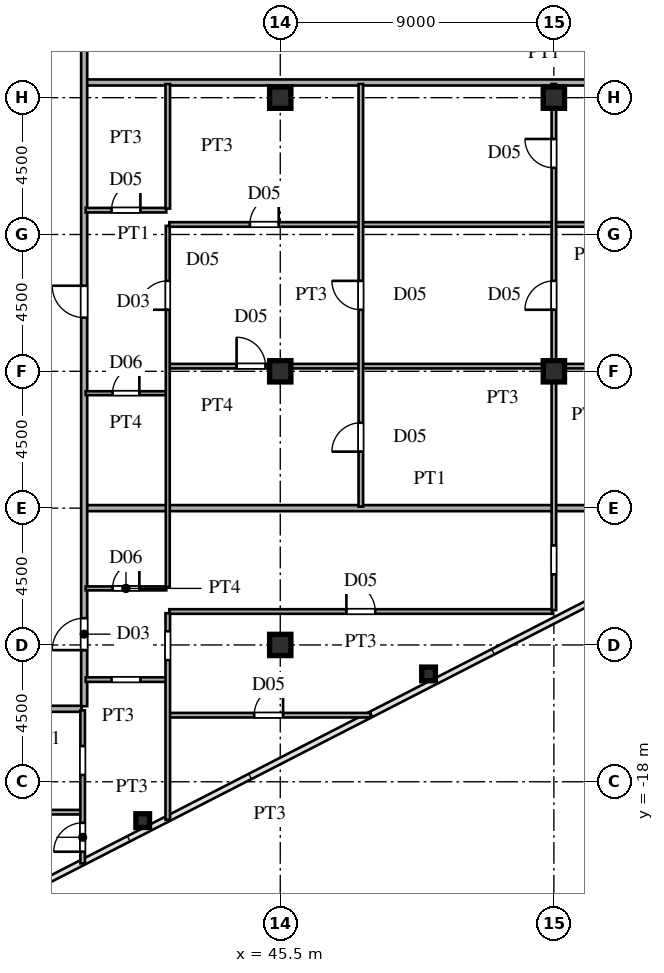
"""IFC4 building model, lengths in metres.
Left out: names, types, materials, properties, quantities, classifications, styles, units other than length and angle.
Written with IfcOpenShell. Run it as: python <this file> out.ifc"""

import sys

from ifc_helpers import new_model, si_unit, direction, frame, frame_2d, origin, origin_2d, place, context, subcontext, project, spatial, rectangle, hollow_rectangle, i_section, extrude, source, transform, mapped, element, fill, save


model = new_model("IFC4")
c1 = context("Model", 3, precision=1e-05, world=origin(), true_north=direction((0.0, 1.0)))
c2 = subcontext(c1, "Body", "Model", "MODEL_VIEW")
j1 = project(units=[si_unit("LENGTHUNIT", "METRE"), si_unit("PLANEANGLEUNIT", "RADIAN")], contexts=[c1])
p1 = place(None, origin())
s1 = spatial("IfcSite", under=j1, at=p1, CompositionType="ELEMENT")
p2 = place(p1, origin())
s2 = spatial("IfcBuilding", under=s1, at=p2, CompositionType="ELEMENT")
p3 = place(p2, frame((0.0, 0.0, 132.0)))
s3 = spatial("IfcBuildingStorey", under=s2, at=p3, CompositionType="ELEMENT", Elevation=132.0)
m1 = source(origin(), c2, "Body", "SweptSolid", [
    extrude(i_section(OverallWidth=0.7, OverallDepth=0.7, WebThickness=0.028, FlangeThickness=0.045, at=origin_2d()), origin(), (0.0, 0.0, 1.0), 3.6),
])
for number, where, z_axis, x_axis in (
    (1, (45.5, -13.5, 0.0), (0.0, 0.0, 1.0), (1.0, 0.0, 0.0)),
    (2, (45.5, -4.5, 0.0), (0.0, 0.0, 1.0), (1.0, 0.0, 0.0)),
    (3, (45.5, 4.5, 0.0), (0.0, 0.0, 1.0), (1.0, 0.0, 0.0)),
    (4, (54.5, -4.5, 0.0), (0.0, 0.0, 1.0), (1.0, 0.0, 0.0)),
    (5, (54.5, 4.5, 0.0), (0.0, 0.0, 1.0), (1.0, 0.0, 0.0)),
):
    element("IfcColumn", number, at=place(p3, frame(where, z_axis=z_axis, x_axis=x_axis)), inside=s3, PredefinedType="COLUMN", context=c2, shape_type="MappedRepresentation", body=[
        mapped(m1, transform((0.0, 0.0, 0.0), scale=1.0)),
    ])
m2 = source(origin(), c2, "Body", "SweptSolid", [
    extrude(hollow_rectangle(XDim=0.45, YDim=0.45, WallThickness=0.018, at=origin_2d()), origin(), (0.0, 0.0, 1.0), 3.6),
])
for number, where, z_axis, x_axis in (
    (6, (40.976, -19.278, 0.0), (0.0, 0.0, 1.0), (1.0, 0.0, 0.0)),
    (7, (50.377, -14.453, 0.0), (0.0, 0.0, 1.0), (1.0, 0.0, 0.0)),
):
    element("IfcColumn", number, at=place(p3, frame(where, z_axis=z_axis, x_axis=x_axis)), inside=s3, PredefinedType="COLUMN", context=c2, shape_type="MappedRepresentation", body=[
        mapped(m2, transform((0.0, 0.0, 0.0), scale=1.0)),
    ])
p4 = place(p3, frame((27.465, -19.0, 0.0), z_axis=(0.0, 0.0, 1.0), x_axis=(1.0, 0.0, 0.0)))
e8 = element("IfcWall", 8, at=p4, inside=s3, PredefinedType="PARTITIONING", context=c2, shape_type="SweptSolid", body=[
    extrude(rectangle(XDim=11.485, YDim=0.15, at=frame_2d((5.742, 0.0))), origin(), (0.0, 0.0, 1.0), 3.34),
])
p5 = place(p3, frame((41.85, -15.81, 0.0), z_axis=(0.0, 0.0, 1.0), x_axis=(1.0, 0.0, 0.0)))
e9 = element("IfcWall", 9, at=p5, inside=s3, PredefinedType="PARTITIONING", context=c2, shape_type="SweptSolid", body=[
    extrude(rectangle(XDim=6.62, YDim=0.15, at=frame_2d((3.31, 0.0))), origin(), (0.0, 0.0, 1.0), 3.34),
])
p6 = place(p5, frame((2.792, 0.0, 0.0)))
e10 = element("IfcOpeningElement", 10, at=p6, cuts=e9, PredefinedType="OPENING", context=c2, shape_type="SweptSolid", body=[
    extrude(rectangle(XDim=0.95, YDim=2.15, at=frame_2d((0.475, 1.075))), frame((0.0, 0.085, 0.0), z_axis=(0.0, -1.0, 0.0), x_axis=(1.0, 0.0, 0.0)), (0.0, 0.0, 1.0), 0.17),
])
p7 = place(p3, frame((36.585, -15.6, 0.0), z_axis=(0.0, 0.0, 1.0), x_axis=(1.0, 0.0, 0.0)))
e11 = element("IfcWall", 11, at=p7, inside=s3, PredefinedType="PARTITIONING", context=c2, shape_type="SweptSolid", body=[
    extrude(rectangle(XDim=2.38, YDim=0.2, at=frame_2d((1.19, 0.0))), origin(), (0.0, 0.0, 1.0), 3.34),
])
p8 = place(p3, frame((39.1, -14.64, 0.0), z_axis=(0.0, 0.0, 1.0), x_axis=(1.0, 0.0, 0.0)))
e12 = element("IfcWall", 12, at=p8, inside=s3, PredefinedType="PARTITIONING", context=c2, shape_type="SweptSolid", body=[
    extrude(rectangle(XDim=2.65, YDim=0.15, at=frame_2d((1.325, 0.0))), origin(), (0.0, 0.0, 1.0), 3.34),
])
p9 = place(p8, frame((0.85, 0.0, 0.0)))
e13 = element("IfcOpeningElement", 13, at=p9, cuts=e12, PredefinedType="OPENING", context=c2, shape_type="SweptSolid", body=[
    extrude(rectangle(XDim=0.95, YDim=2.15, at=frame_2d((0.475, 1.075))), frame((0.0, 0.085, 0.0), z_axis=(0.0, -1.0, 0.0), x_axis=(1.0, 0.0, 0.0)), (0.0, 0.0, 1.0), 0.17),
])
p10 = place(p3, frame((41.85, -12.4, 0.0), z_axis=(0.0, 0.0, 1.0), x_axis=(1.0, 0.0, 0.0)))
e14 = element("IfcWall", 14, at=p10, inside=s3, PredefinedType="PARTITIONING", context=c2, shape_type="SweptSolid", body=[
    extrude(rectangle(XDim=12.6, YDim=0.15, at=frame_2d((6.3, 0.0))), origin(), (0.0, 0.0, 1.0), 3.34),
])
p11 = place(p10, frame((5.825, 0.0, 0.0)))
e15 = element("IfcOpeningElement", 15, at=p11, cuts=e14, PredefinedType="OPENING", context=c2, shape_type="SweptSolid", body=[
    extrude(rectangle(XDim=0.95, YDim=2.15, at=frame_2d((0.475, 1.075))), frame((0.0, 0.085, 0.0), z_axis=(0.0, -1.0, 0.0), x_axis=(1.0, 0.0, 0.0)), (0.0, 0.0, 1.0), 0.17),
])
p12 = place(p3, frame((39.1, -11.64, 0.0), z_axis=(0.0, 0.0, 1.0), x_axis=(1.0, 0.0, 0.0)))
e16 = element("IfcWall", 16, at=p12, inside=s3, PredefinedType="PARTITIONING", context=c2, shape_type="SweptSolid", body=[
    extrude(rectangle(XDim=2.65, YDim=0.13, at=frame_2d((1.325, 0.0))), origin(), (0.0, 0.0, 1.0), 3.34),
])
p13 = place(p12, frame((0.885, 0.0, 0.0)))
e17 = element("IfcOpeningElement", 17, at=p13, cuts=e16, PredefinedType="OPENING", context=c2, shape_type="SweptSolid", body=[
    extrude(rectangle(XDim=0.88, YDim=2.1, at=frame_2d((0.44, 1.05))), frame((0.0, 0.075, 0.0), z_axis=(0.0, -1.0, 0.0), x_axis=(1.0, 0.0, 0.0)), (0.0, 0.0, 1.0), 0.15),
])
p14 = place(p3, frame((39.13, -9.0, 0.0), z_axis=(0.0, 0.0, 1.0), x_axis=(1.0, 0.0, 0.0)))
e18 = element("IfcWall", 18, at=p14, inside=s3, PredefinedType="PARTITIONING", context=c2, shape_type="SweptSolid", body=[
    extrude(rectangle(XDim=22.586, YDim=0.2, at=frame_2d((11.293, 0.0))), origin(), (0.0, 0.0, 1.0), 3.34),
])
p15 = place(p3, frame((39.1, -5.22, 0.0), z_axis=(0.0, 0.0, 1.0), x_axis=(1.0, 0.0, 0.0)))
e19 = element("IfcWall", 19, at=p15, inside=s3, PredefinedType="PARTITIONING", context=c2, shape_type="SweptSolid", body=[
    extrude(rectangle(XDim=2.65, YDim=0.13, at=frame_2d((1.325, 0.0))), origin(), (0.0, 0.0, 1.0), 3.34),
])
p16 = place(p15, frame((0.885, 0.0, 0.0)))
e20 = element("IfcOpeningElement", 20, at=p16, cuts=e19, PredefinedType="OPENING", context=c2, shape_type="SweptSolid", body=[
    extrude(rectangle(XDim=0.88, YDim=2.1, at=frame_2d((0.44, 1.05))), frame((0.0, 0.075, 0.0), z_axis=(0.0, -1.0, 0.0), x_axis=(1.0, 0.0, 0.0)), (0.0, 0.0, 1.0), 0.15),
])
p17 = place(p3, frame((41.85, -4.33, 0.0), z_axis=(0.0, 0.0, 1.0), x_axis=(1.0, 0.0, 0.0)))
e21 = element("IfcWall", 21, at=p17, inside=s3, PredefinedType="PARTITIONING", context=c2, shape_type="SweptSolid", body=[
    extrude(rectangle(XDim=27.525, YDim=0.15, at=frame_2d((13.762, 0.0))), origin(), (0.0, 0.0, 1.0), 3.34),
])
p18 = place(p17, frame((2.214, 0.0, 0.0)))
e22 = element("IfcOpeningElement", 22, at=p18, cuts=e21, PredefinedType="OPENING", context=c2, shape_type="SweptSolid", body=[
    extrude(rectangle(XDim=0.95, YDim=2.15, at=frame_2d((0.475, 1.075))), frame((0.0, 0.085, 0.0), z_axis=(0.0, -1.0, 0.0), x_axis=(1.0, 0.0, 0.0)), (0.0, 0.0, 1.0), 0.17),
])
p19 = place(p17, frame((15.025, 0.0, 0.0)))
e23 = element("IfcOpeningElement", 23, at=p19, cuts=e21, PredefinedType="OPENING", context=c2, shape_type="SweptSolid", body=[
    extrude(rectangle(XDim=0.95, YDim=2.15, at=frame_2d((0.475, 1.075))), frame((0.0, 0.085, 0.0), z_axis=(0.0, -1.0, 0.0), x_axis=(1.0, 0.0, 0.0)), (0.0, 0.0, 1.0), 0.17),
])
p20 = place(p3, frame((41.85, 0.33, 0.0), z_axis=(0.0, 0.0, 1.0), x_axis=(1.0, 0.0, 0.0)))
e24 = element("IfcWall", 24, at=p20, inside=s3, PredefinedType="PARTITIONING", context=c2, shape_type="SweptSolid", body=[
    extrude(rectangle(XDim=27.685, YDim=0.15, at=frame_2d((13.842, 0.0))), origin(), (0.0, 0.0, 1.0), 3.34),
])
p21 = place(p20, frame((2.65, 0.0, 0.0)))
e25 = element("IfcOpeningElement", 25, at=p21, cuts=e24, PredefinedType="OPENING", context=c2, shape_type="SweptSolid", body=[
    extrude(rectangle(XDim=0.95, YDim=2.15, at=frame_2d((0.475, 1.075))), frame((0.0, 0.085, 0.0), z_axis=(0.0, -1.0, 0.0), x_axis=(1.0, 0.0, 0.0)), (0.0, 0.0, 1.0), 0.17),
])
p22 = place(p20, frame((15.025, 0.0, 0.0)))
e26 = element("IfcOpeningElement", 26, at=p22, cuts=e24, PredefinedType="OPENING", context=c2, shape_type="SweptSolid", body=[
    extrude(rectangle(XDim=0.95, YDim=2.15, at=frame_2d((0.475, 1.075))), frame((0.0, 0.085, 0.0), z_axis=(0.0, -1.0, 0.0), x_axis=(1.0, 0.0, 0.0)), (0.0, 0.0, 1.0), 0.17),
])
p23 = place(p3, frame((39.1, 0.8, 0.0), z_axis=(0.0, 0.0, 1.0), x_axis=(1.0, 0.0, 0.0)))
e27 = element("IfcWall", 27, at=p23, inside=s3, PredefinedType="PARTITIONING", context=c2, shape_type="SweptSolid", body=[
    extrude(rectangle(XDim=2.65, YDim=0.15, at=frame_2d((1.325, 0.0))), origin(), (0.0, 0.0, 1.0), 3.34),
])
p24 = place(p23, frame((0.85, 0.0, 0.0)))
e28 = element("IfcOpeningElement", 28, at=p24, cuts=e27, PredefinedType="OPENING", context=c2, shape_type="SweptSolid", body=[
    extrude(rectangle(XDim=0.95, YDim=2.15, at=frame_2d((0.475, 1.075))), frame((0.0, 0.085, 0.0), z_axis=(0.0, -1.0, 0.0), x_axis=(1.0, 0.0, 0.0)), (0.0, 0.0, 1.0), 0.17),
])
p25 = place(p3, frame((39.13, 5.0, 0.0), z_axis=(0.0, 0.0, 1.0), x_axis=(1.0, 0.0, 0.0)))
e29 = element("IfcWall", 29, at=p25, inside=s3, PredefinedType="PARTITIONING", context=c2, shape_type="SweptSolid", body=[
    extrude(rectangle(XDim=30.096, YDim=0.2, at=frame_2d((15.048, 0.0))), origin(), (0.0, 0.0, 1.0), 3.34),
])
p26 = place(p3, frame((39.0, -20.686, 0.0), z_axis=(0.0, 0.0, 1.0), x_axis=(0.0, 1.0, 0.0)))
e30 = element("IfcWall", 30, at=p26, inside=s3, PredefinedType="PARTITIONING", context=c2, shape_type="SweptSolid", body=[
    extrude(rectangle(XDim=5.036, YDim=0.15, at=frame_2d((2.518, 0.0))), origin(), (0.0, 0.0, 1.0), 3.34),
])
p27 = place(p26, frame((0.385, 0.0, 0.0)))
e31 = element("IfcOpeningElement", 31, at=p27, cuts=e30, PredefinedType="OPENING", context=c2, shape_type="SweptSolid", body=[
    extrude(rectangle(XDim=0.95, YDim=2.15, at=frame_2d((0.475, 1.075))), frame((0.0, 0.085, 0.0), z_axis=(0.0, -1.0, 0.0), x_axis=(1.0, 0.0, 0.0)), (0.0, 0.0, 1.0), 0.17),
])
p28 = place(p26, frame((2.911, 0.0, 0.0)))
e32 = element("IfcOpeningElement", 32, at=p28, cuts=e30, PredefinedType="OPENING", context=c2, shape_type="SweptSolid", body=[
    extrude(rectangle(XDim=0.95, YDim=2.15, at=frame_2d((0.475, 1.075))), frame((0.0, 0.085, 0.0), z_axis=(0.0, -1.0, 0.0), x_axis=(1.0, 0.0, 0.0)), (0.0, 0.0, 1.0), 0.17),
])
p29 = place(p3, frame((39.05, -15.515, 0.0), z_axis=(0.0, 0.0, 1.0), x_axis=(0.0, 1.0, 0.0)))
e33 = element("IfcWall", 33, at=p29, inside=s3, PredefinedType="PARTITIONING", context=c2, shape_type="SweptSolid", body=[
    extrude(rectangle(XDim=31.03, YDim=0.2, at=frame_2d((15.515, 0.0))), origin(), (0.0, 0.0, 1.0), 3.34),
])
p30 = place(p29, frame((1.845, 0.0, 0.0)))
e34 = element("IfcOpeningElement", 34, at=p30, cuts=e33, PredefinedType="OPENING", context=c2, shape_type="SweptSolid", body=[
    extrude(rectangle(XDim=1.05, YDim=2.25, at=frame_2d((0.525, 1.125))), frame((0.0, 0.11, 0.0), z_axis=(0.0, -1.0, 0.0), x_axis=(1.0, 0.0, 0.0)), (0.0, 0.0, 1.0), 0.22),
])
p31 = place(p29, frame((12.78, 0.0, 0.0)))
e35 = element("IfcOpeningElement", 35, at=p31, cuts=e33, PredefinedType="OPENING", context=c2, shape_type="SweptSolid", body=[
    extrude(rectangle(XDim=1.05, YDim=2.25, at=frame_2d((0.525, 1.125))), frame((0.0, 0.11, 0.0), z_axis=(0.0, -1.0, 0.0), x_axis=(1.0, 0.0, 0.0)), (0.0, 0.0, 1.0), 0.22),
])
p32 = place(p29, frame((25.29, 0.0, 0.0)))
e36 = element("IfcOpeningElement", 36, at=p32, cuts=e33, PredefinedType="OPENING", context=c2, shape_type="SweptSolid", body=[
    extrude(rectangle(XDim=1.05, YDim=2.25, at=frame_2d((0.525, 1.125))), frame((0.0, 0.11, 0.0), z_axis=(0.0, -1.0, 0.0), x_axis=(1.0, 0.0, 0.0)), (0.0, 0.0, 1.0), 0.22),
])
p33 = place(p3, frame((41.8, -19.25, 0.0), z_axis=(0.0, 0.0, 1.0), x_axis=(0.0, 1.0, 0.0)))
e37 = element("IfcWall", 37, at=p33, inside=s3, PredefinedType="PARTITIONING", context=c2, shape_type="SweptSolid", body=[
    extrude(rectangle(XDim=6.795, YDim=0.15, at=frame_2d((3.397, 0.0))), origin(), (0.0, 0.0, 1.0), 3.34),
])
p34 = place(p33, frame((5.25, 0.0, 0.0)))
e38 = element("IfcOpeningElement", 38, at=p34, cuts=e37, PredefinedType="OPENING", context=c2, shape_type="SweptSolid", body=[
    extrude(rectangle(XDim=0.95, YDim=2.15, at=frame_2d((0.475, 1.075))), frame((0.0, 0.085, 0.0), z_axis=(0.0, -1.0, 0.0), x_axis=(1.0, 0.0, 0.0)), (0.0, 0.0, 1.0), 0.17),
])
p35 = place(p3, frame((41.8, -11.595, 0.0), z_axis=(0.0, 0.0, 1.0), x_axis=(0.0, 1.0, 0.0)))
e39 = element("IfcWall", 39, at=p35, inside=s3, PredefinedType="PARTITIONING", context=c2, shape_type="SweptSolid", body=[
    extrude(rectangle(XDim=11.878, YDim=0.13, at=frame_2d((5.939, 0.0))), origin(), (0.0, 0.0, 1.0), 3.34),
])
p36 = place(p35, frame((9.12, 0.0, 0.0)))
e40 = element("IfcOpeningElement", 40, at=p36, cuts=e39, PredefinedType="OPENING", context=c2, shape_type="SweptSolid", body=[
    extrude(rectangle(XDim=0.95, YDim=2.15, at=frame_2d((0.475, 1.075))), frame((0.0, 0.075, 0.0), z_axis=(0.0, -1.0, 0.0), x_axis=(1.0, 0.0, 0.0)), (0.0, 0.0, 1.0), 0.15),
])
p37 = place(p3, frame((41.8, 0.852, 0.0), z_axis=(0.0, 0.0, 1.0), x_axis=(0.0, 1.0, 0.0)))
e41 = element("IfcWall", 41, at=p37, inside=s3, PredefinedType="PARTITIONING", context=c2, shape_type="SweptSolid", body=[
    extrude(rectangle(XDim=4.098, YDim=0.15, at=frame_2d((2.049, 0.0))), origin(), (0.0, 0.0, 1.0), 3.34),
])
p38 = place(p3, frame((48.15, -8.95, 0.0), z_axis=(0.0, 0.0, 1.0), x_axis=(0.0, 1.0, 0.0)))
e42 = element("IfcWall", 42, at=p38, inside=s3, PredefinedType="PARTITIONING", context=c2, shape_type="SweptSolid", body=[
    extrude(rectangle(XDim=13.9, YDim=0.15, at=frame_2d((6.95, 0.0))), origin(), (0.0, 0.0, 1.0), 3.34),
])
p39 = place(p38, frame((6.475, 0.0, 0.0)))
e43 = element("IfcOpeningElement", 43, at=p39, cuts=e42, PredefinedType="OPENING", context=c2, shape_type="SweptSolid", body=[
    extrude(rectangle(XDim=0.95, YDim=2.15, at=frame_2d((0.475, 1.075))), frame((0.0, 0.085, 0.0), z_axis=(0.0, -1.0, 0.0), x_axis=(1.0, 0.0, 0.0)), (0.0, 0.0, 1.0), 0.17),
])
p40 = place(p38, frame((1.808, 0.0, 0.0)))
e44 = element("IfcOpeningElement", 44, at=p40, cuts=e42, PredefinedType="OPENING", context=c2, shape_type="SweptSolid", body=[
    extrude(rectangle(XDim=0.95, YDim=2.15, at=frame_2d((0.475, 1.075))), frame((0.0, 0.085, 0.0), z_axis=(0.0, -1.0, 0.0), x_axis=(1.0, 0.0, 0.0)), (0.0, 0.0, 1.0), 0.17),
])
p41 = place(p3, frame((54.5, -12.355, 0.0), z_axis=(0.0, 0.0, 1.0), x_axis=(0.0, 1.0, 0.0)))
e45 = element("IfcWall", 45, at=p41, inside=s3, PredefinedType="PARTITIONING", context=c2, shape_type="SweptSolid", body=[
    extrude(rectangle(XDim=7.835, YDim=0.15, at=frame_2d((3.917, 0.0))), origin(), (0.0, 0.0, 1.0), 3.34),
])
p42 = place(p41, frame((1.177, 0.0, 0.0)))
e46 = element("IfcOpeningElement", 46, at=p42, cuts=e45, PredefinedType="OPENING", context=c2, shape_type="SweptSolid", body=[
    extrude(rectangle(XDim=0.95, YDim=2.15, at=frame_2d((0.475, 1.075))), frame((0.0, 0.085, 0.0), z_axis=(0.0, -1.0, 0.0), x_axis=(1.0, 0.0, 0.0)), (0.0, 0.0, 1.0), 0.17),
])
p43 = place(p3, frame((54.5, -4.52, 0.0), z_axis=(0.0, 0.0, 1.0), x_axis=(0.0, 1.0, 0.0)))
e47 = element("IfcWall", 47, at=p43, inside=s3, PredefinedType="PARTITIONING", context=c2, shape_type="SweptSolid", body=[
    extrude(rectangle(XDim=9.47, YDim=0.15, at=frame_2d((4.735, 0.0))), origin(), (0.0, 0.0, 1.0), 2.44),
])
p44 = place(p43, frame((2.045, 0.0, 0.0)))
e48 = element("IfcOpeningElement", 48, at=p44, cuts=e47, PredefinedType="OPENING", context=c2, shape_type="SweptSolid", body=[
    extrude(rectangle(XDim=0.95, YDim=2.15, at=frame_2d((0.475, 1.075))), frame((0.0, 0.085, 0.0), z_axis=(0.0, -1.0, 0.0), x_axis=(1.0, 0.0, 0.0)), (0.0, 0.0, 1.0), 0.17),
])
p45 = place(p43, frame((6.712, 0.0, 0.0)))
e49 = element("IfcOpeningElement", 49, at=p45, cuts=e47, PredefinedType="OPENING", context=c2, shape_type="SweptSolid", body=[
    extrude(rectangle(XDim=0.95, YDim=2.15, at=frame_2d((0.475, 1.075))), frame((0.0, 0.085, 0.0), z_axis=(0.0, -1.0, 0.0), x_axis=(1.0, 0.0, 0.0)), (0.0, 0.0, 1.0), 0.17),
])
m3 = source(origin(), c2, "Body", "SweptSolid", [
    extrude(rectangle(XDim=0.95, YDim=2.15, at=frame_2d((0.475, 1.075))), frame((0.0, 0.025, 0.0), z_axis=(0.0, -1.0, 0.0), x_axis=(1.0, 0.0, 0.0)), (0.0, 0.0, 1.0), 0.05),
])
p46 = place(p6, origin())
e50 = element("IfcDoor", 50, at=p46, inside=s3, OperationType="SINGLE_SWING_RIGHT", PredefinedType="DOOR", context=c2, shape_type="MappedRepresentation", body=[
    mapped(m3, transform((0.0, 0.0, 0.0), scale=1.0)),
])
fill(e10, e50)
p47 = place(p11, origin())
e51 = element("IfcDoor", 51, at=p47, inside=s3, OperationType="SINGLE_SWING_LEFT", PredefinedType="DOOR", context=c2, shape_type="MappedRepresentation", body=[
    mapped(m3, transform((0.0, 0.0, 0.0), scale=1.0)),
])
fill(e15, e51)
m4 = source(origin(), c2, "Body", "SweptSolid", [
    extrude(rectangle(XDim=0.88, YDim=2.1, at=frame_2d((0.44, 1.05))), frame((0.0, 0.025, 0.0), z_axis=(0.0, -1.0, 0.0), x_axis=(1.0, 0.0, 0.0)), (0.0, 0.0, 1.0), 0.05),
])
p48 = place(p13, origin())
e52 = element("IfcDoor", 52, at=p48, inside=s3, OperationType="SINGLE_SWING_RIGHT", PredefinedType="DOOR", context=c2, shape_type="MappedRepresentation", body=[
    mapped(m4, transform((0.0, 0.0, 0.0), scale=1.0)),
])
fill(e17, e52)
p49 = place(p16, origin())
e53 = element("IfcDoor", 53, at=p49, inside=s3, OperationType="SINGLE_SWING_RIGHT", PredefinedType="DOOR", context=c2, shape_type="MappedRepresentation", body=[
    mapped(m4, transform((0.0, 0.0, 0.0), scale=1.0)),
])
fill(e20, e53)
p50 = place(p18, origin())
e54 = element("IfcDoor", 54, at=p50, inside=s3, OperationType="SINGLE_SWING_LEFT", PredefinedType="DOOR", context=c2, shape_type="MappedRepresentation", body=[
    mapped(m3, transform((0.0, 0.0, 0.0), scale=1.0)),
])
fill(e22, e54)
p51 = place(p21, origin())
e55 = element("IfcDoor", 55, at=p51, inside=s3, OperationType="SINGLE_SWING_RIGHT", PredefinedType="DOOR", context=c2, shape_type="MappedRepresentation", body=[
    mapped(m3, transform((0.0, 0.0, 0.0), scale=1.0)),
])
fill(e25, e55)
p52 = place(p24, origin())
e56 = element("IfcDoor", 56, at=p52, inside=s3, OperationType="SINGLE_SWING_RIGHT", PredefinedType="DOOR", context=c2, shape_type="MappedRepresentation", body=[
    mapped(m3, transform((0.0, 0.0, 0.0), scale=1.0)),
])
fill(e28, e56)
p53 = place(p27, origin())
e57 = element("IfcDoor", 57, at=p53, inside=s3, OperationType="SINGLE_SWING_LEFT", PredefinedType="DOOR", context=c2, shape_type="MappedRepresentation", body=[
    mapped(m3, transform((0.0, 0.0, 0.0), scale=1.0)),
])
fill(e31, e57)
m5 = source(origin(), c2, "Body", "SweptSolid", [
    extrude(rectangle(XDim=1.05, YDim=2.25, at=frame_2d((0.525, 1.125))), frame((0.0, 0.025, 0.0), z_axis=(0.0, -1.0, 0.0), x_axis=(1.0, 0.0, 0.0)), (0.0, 0.0, 1.0), 0.05),
])
p54 = place(p30, origin())
e58 = element("IfcDoor", 58, at=p54, inside=s3, OperationType="SINGLE_SWING_LEFT", PredefinedType="DOOR", context=c2, shape_type="MappedRepresentation", body=[
    mapped(m5, transform((0.0, 0.0, 0.0), scale=1.0)),
])
fill(e34, e58)
p55 = place(p31, origin())
e59 = element("IfcDoor", 59, at=p55, inside=s3, OperationType="SINGLE_SWING_RIGHT", PredefinedType="DOOR", context=c2, shape_type="MappedRepresentation", body=[
    mapped(m5, transform((0.0, 0.0, 0.0), scale=1.0)),
])
fill(e35, e59)
p56 = place(p36, origin())
e60 = element("IfcDoor", 60, at=p56, inside=s3, OperationType="SINGLE_SWING_LEFT", PredefinedType="DOOR", context=c2, shape_type="MappedRepresentation", body=[
    mapped(m3, transform((0.0, 0.0, 0.0), scale=1.0)),
])
fill(e40, e60)
p57 = place(p39, origin())
e61 = element("IfcDoor", 61, at=p57, inside=s3, OperationType="SINGLE_SWING_RIGHT", PredefinedType="DOOR", context=c2, shape_type="MappedRepresentation", body=[
    mapped(m3, transform((0.0, 0.0, 0.0), scale=1.0)),
])
fill(e43, e61)
p58 = place(p40, origin())
e62 = element("IfcDoor", 62, at=p58, inside=s3, OperationType="SINGLE_SWING_LEFT", PredefinedType="DOOR", context=c2, shape_type="MappedRepresentation", body=[
    mapped(m3, transform((0.0, 0.0, 0.0), scale=1.0)),
])
fill(e44, e62)
p59 = place(p44, origin())
e63 = element("IfcDoor", 63, at=p59, inside=s3, OperationType="SINGLE_SWING_LEFT", PredefinedType="DOOR", context=c2, shape_type="MappedRepresentation", body=[
    mapped(m3, transform((0.0, 0.0, 0.0), scale=1.0)),
])
fill(e48, e63)
p60 = place(p45, origin())
e64 = element("IfcDoor", 64, at=p60, inside=s3, OperationType="SINGLE_SWING_RIGHT", PredefinedType="DOOR", context=c2, shape_type="MappedRepresentation", body=[
    mapped(m3, transform((0.0, 0.0, 0.0), scale=1.0)),
])
fill(e49, e64)
save(model, sys.argv[1])
